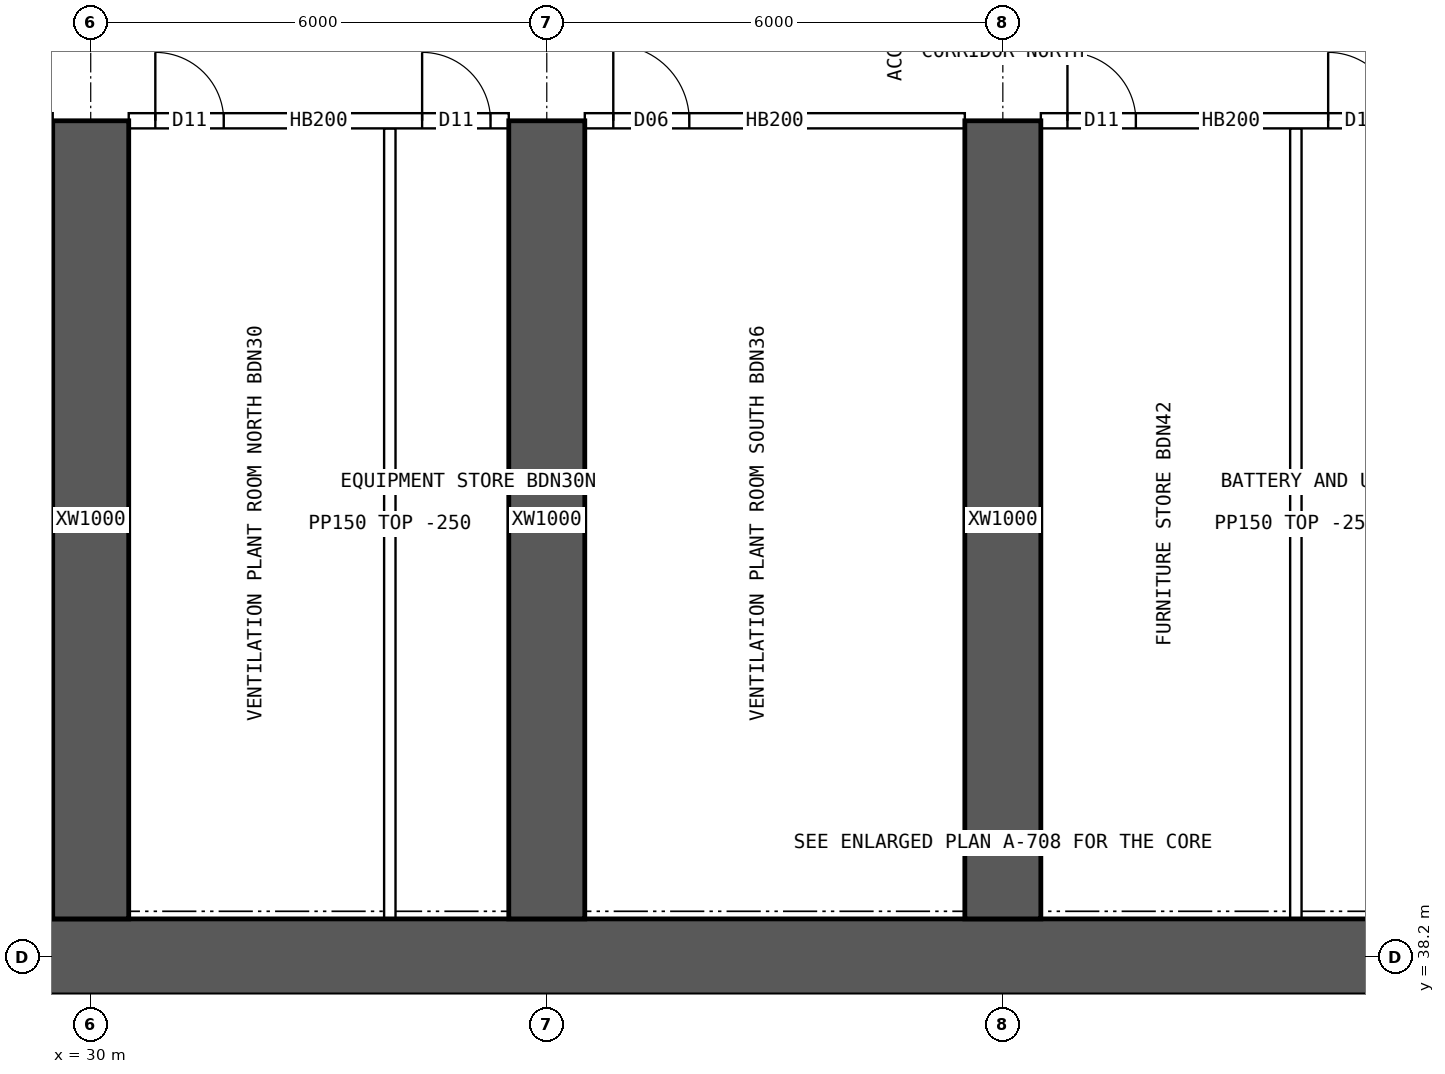
"""IFC4 building model, lengths in metres.
Left out: names, types, materials, properties, quantities, classifications, styles, units other than length and angle.
Written with IfcOpenShell. Run it as: python <this file> out.ifc"""

import sys

from ifc_helpers import new_model, si_unit, direction, frame, frame_2d, origin, place, context, subcontext, project, spatial, rectangle, extrude, element, fill, save


model = new_model("IFC4")
c1 = context("Model", 3, precision=1e-05, world=origin(), true_north=direction((0.0, 1.0)))
c2 = subcontext(c1, "Body", "Model", "MODEL_VIEW")
j1 = project(units=[si_unit("LENGTHUNIT", "METRE"), si_unit("PLANEANGLEUNIT", "RADIAN")], contexts=[c1])
p1 = place(None, origin())
s1 = spatial("IfcSite", under=j1, at=p1, CompositionType="ELEMENT")
p2 = place(p1, origin())
s2 = spatial("IfcBuilding", under=s1, at=p2, CompositionType="ELEMENT")
p3 = place(p2, frame((0.0, 0.0, 23.95)))
s3 = spatial("IfcBuildingStorey", under=s2, at=p3, CompositionType="ELEMENT", Elevation=23.95)
p4 = place(p3, frame((18.0, 38.2, 0.0), z_axis=(0.0, 0.0, 1.0), x_axis=(1.0, 0.0, 0.0)))
e1 = element("IfcWall", 1, at=p4, inside=s3, PredefinedType="SHEAR", context=c2, shape_type="SweptSolid", body=[
    extrude(rectangle(XDim=48.0, YDim=1.0, at=frame_2d((24.0, 0.0))), origin(), (0.0, 0.0, 1.0), 3.75),
])
for number, where, z_axis, x_axis in (
    (2, (30.0, 38.7, 0.0), (0.0, 0.0, 1.0), (0.0, 1.0, 0.0)),
    (3, (36.0, 38.7, 0.0), (0.0, 0.0, 1.0), (0.0, 1.0, 0.0)),
    (4, (42.0, 38.7, 0.0), (0.0, 0.0, 1.0), (0.0, 1.0, 0.0)),
):
    element("IfcWall", number, at=place(p3, frame(where, z_axis=z_axis, x_axis=x_axis)), inside=s3, PredefinedType="SHEAR", context=c2, shape_type="SweptSolid", body=[
        extrude(rectangle(XDim=10.5, YDim=1.0, at=frame_2d((5.25, 0.0))), origin(), (0.0, 0.0, 1.0), 3.75),
    ])
for number, where, z_axis, x_axis in (
    (5, (29.651, 34.75, 0.0), (0.0, 0.0, 1.0), (0.0, 1.0, 0.0)),
    (6, (33.946, 34.75, 0.0), (0.0, 0.0, 1.0), (0.0, 1.0, 0.0)),
    (7, (36.946, 34.75, 0.0), (0.0, 0.0, 1.0), (0.0, 1.0, 0.0)),
    (8, (41.463, 34.75, 0.0), (0.0, 0.0, 1.0), (0.0, 1.0, 0.0)),
    (9, (45.758, 34.75, 0.0), (0.0, 0.0, 1.0), (0.0, 1.0, 0.0)),
):
    element("IfcWall", number, at=place(p3, frame(where, z_axis=z_axis, x_axis=x_axis)), inside=s3, PredefinedType="SOLIDWALL", context=c2, shape_type="SweptSolid", body=[
        extrude(rectangle(XDim=2.95, YDim=0.15, at=frame_2d((1.475, 0.0))), origin(), (0.0, 0.0, 1.0), 3.5),
    ])
p5 = place(p3, frame((30.5, 49.2, 0.0), z_axis=(0.0, 0.0, 1.0), x_axis=(1.0, 0.0, 0.0)))
e10 = element("IfcWall", 10, at=p5, inside=s3, PredefinedType="SOLIDWALL", context=c2, shape_type="SweptSolid", body=[
    extrude(rectangle(XDim=5.0, YDim=0.2, at=frame_2d((2.5, 0.0))), origin(), (0.0, 0.0, 1.0), 3.5),
])
p6 = place(p5, frame((0.35, 0.0, 0.0)))
e11 = element("IfcOpeningElement", 11, at=p6, cuts=e10, PredefinedType="OPENING", context=c2, shape_type="SweptSolid", body=[
    extrude(rectangle(XDim=0.9, YDim=2.1, at=frame_2d((0.45, 1.05))), frame((0.0, 0.11, 0.0), z_axis=(0.0, -1.0, 0.0), x_axis=(1.0, 0.0, 0.0)), (0.0, 0.0, 1.0), 0.22),
])
p7 = place(p5, frame((3.86, 0.0, 0.0)))
e12 = element("IfcOpeningElement", 12, at=p7, cuts=e10, PredefinedType="OPENING", context=c2, shape_type="SweptSolid", body=[
    extrude(rectangle(XDim=0.9, YDim=2.1, at=frame_2d((0.45, 1.05))), frame((0.0, 0.11, 0.0), z_axis=(0.0, -1.0, 0.0), x_axis=(1.0, 0.0, 0.0)), (0.0, 0.0, 1.0), 0.22),
])
p8 = place(p3, frame((36.5, 49.2, 0.0), z_axis=(0.0, 0.0, 1.0), x_axis=(1.0, 0.0, 0.0)))
e13 = element("IfcWall", 13, at=p8, inside=s3, PredefinedType="SOLIDWALL", context=c2, shape_type="SweptSolid", body=[
    extrude(rectangle(XDim=5.0, YDim=0.2, at=frame_2d((2.5, 0.0))), origin(), (0.0, 0.0, 1.0), 3.5),
])
p9 = place(p8, frame((0.375, 0.0, 0.0)))
e14 = element("IfcOpeningElement", 14, at=p9, cuts=e13, PredefinedType="OPENING", context=c2, shape_type="SweptSolid", body=[
    extrude(rectangle(XDim=1.0, YDim=2.1, at=frame_2d((0.5, 1.05))), frame((0.0, 0.11, 0.0), z_axis=(0.0, -1.0, 0.0), x_axis=(1.0, 0.0, 0.0)), (0.0, 0.0, 1.0), 0.22),
])
p10 = place(p3, frame((42.5, 49.2, 0.0), z_axis=(0.0, 0.0, 1.0), x_axis=(1.0, 0.0, 0.0)))
e15 = element("IfcWall", 15, at=p10, inside=s3, PredefinedType="SOLIDWALL", context=c2, shape_type="SweptSolid", body=[
    extrude(rectangle(XDim=5.0, YDim=0.2, at=frame_2d((2.5, 0.0))), origin(), (0.0, 0.0, 1.0), 3.5),
])
p11 = place(p10, frame((0.35, 0.0, 0.0)))
e16 = element("IfcOpeningElement", 16, at=p11, cuts=e15, PredefinedType="OPENING", context=c2, shape_type="SweptSolid", body=[
    extrude(rectangle(XDim=0.9, YDim=2.1, at=frame_2d((0.45, 1.05))), frame((0.0, 0.11, 0.0), z_axis=(0.0, -1.0, 0.0), x_axis=(1.0, 0.0, 0.0)), (0.0, 0.0, 1.0), 0.22),
])
p12 = place(p10, frame((3.78, 0.0, 0.0)))
e17 = element("IfcOpeningElement", 17, at=p12, cuts=e15, PredefinedType="OPENING", context=c2, shape_type="SweptSolid", body=[
    extrude(rectangle(XDim=0.9, YDim=2.1, at=frame_2d((0.45, 1.05))), frame((0.0, 0.11, 0.0), z_axis=(0.0, -1.0, 0.0), x_axis=(1.0, 0.0, 0.0)), (0.0, 0.0, 1.0), 0.22),
])
for number, where, z_axis, x_axis in (
    (18, (33.935, 38.7, 0.0), (0.0, 0.0, 1.0), (0.0, 1.0, 0.0)),
    (19, (45.855, 38.7, 0.0), (0.0, 0.0, 1.0), (0.0, 1.0, 0.0)),
):
    element("IfcWall", number, at=place(p3, frame(where, z_axis=z_axis, x_axis=x_axis)), inside=s3, PredefinedType="PARTITIONING", context=c2, shape_type="SweptSolid", body=[
        extrude(rectangle(XDim=10.4, YDim=0.15, at=frame_2d((5.2, 0.0))), origin(), (0.0, 0.0, 1.0), 3.5),
    ])
p13 = place(p6, origin())
e20 = element("IfcDoor", 20, at=p13, inside=s3, OperationType="SINGLE_SWING_LEFT", PredefinedType="DOOR", context=c2, shape_type="SweptSolid", body=[
    extrude(rectangle(XDim=0.9, YDim=2.1, at=frame_2d((0.45, 1.05))), frame((0.0, 0.025, 0.0), z_axis=(0.0, -1.0, 0.0), x_axis=(1.0, 0.0, 0.0)), (0.0, 0.0, 1.0), 0.05),
])
fill(e11, e20)
p14 = place(p7, origin())
e21 = element("IfcDoor", 21, at=p14, inside=s3, OperationType="SINGLE_SWING_LEFT", PredefinedType="DOOR", context=c2, shape_type="SweptSolid", body=[
    extrude(rectangle(XDim=0.9, YDim=2.1, at=frame_2d((0.45, 1.05))), frame((0.0, 0.025, 0.0), z_axis=(0.0, -1.0, 0.0), x_axis=(1.0, 0.0, 0.0)), (0.0, 0.0, 1.0), 0.05),
])
fill(e12, e21)
p15 = place(p9, origin())
e22 = element("IfcDoor", 22, at=p15, inside=s3, OperationType="SINGLE_SWING_LEFT", PredefinedType="DOOR", context=c2, shape_type="SweptSolid", body=[
    extrude(rectangle(XDim=1.0, YDim=2.1, at=frame_2d((0.5, 1.05))), frame((0.0, 0.025, 0.0), z_axis=(0.0, -1.0, 0.0), x_axis=(1.0, 0.0, 0.0)), (0.0, 0.0, 1.0), 0.05),
])
fill(e14, e22)
p16 = place(p11, origin())
e23 = element("IfcDoor", 23, at=p16, inside=s3, OperationType="SINGLE_SWING_LEFT", PredefinedType="DOOR", context=c2, shape_type="SweptSolid", body=[
    extrude(rectangle(XDim=0.9, YDim=2.1, at=frame_2d((0.45, 1.05))), frame((0.0, 0.025, 0.0), z_axis=(0.0, -1.0, 0.0), x_axis=(1.0, 0.0, 0.0)), (0.0, 0.0, 1.0), 0.05),
])
fill(e16, e23)
p17 = place(p12, origin())
e24 = element("IfcDoor", 24, at=p17, inside=s3, OperationType="SINGLE_SWING_LEFT", PredefinedType="DOOR", context=c2, shape_type="SweptSolid", body=[
    extrude(rectangle(XDim=0.9, YDim=2.1, at=frame_2d((0.45, 1.05))), frame((0.0, 0.025, 0.0), z_axis=(0.0, -1.0, 0.0), x_axis=(1.0, 0.0, 0.0)), (0.0, 0.0, 1.0), 0.05),
])
fill(e17, e24)
save(model, sys.argv[1])
